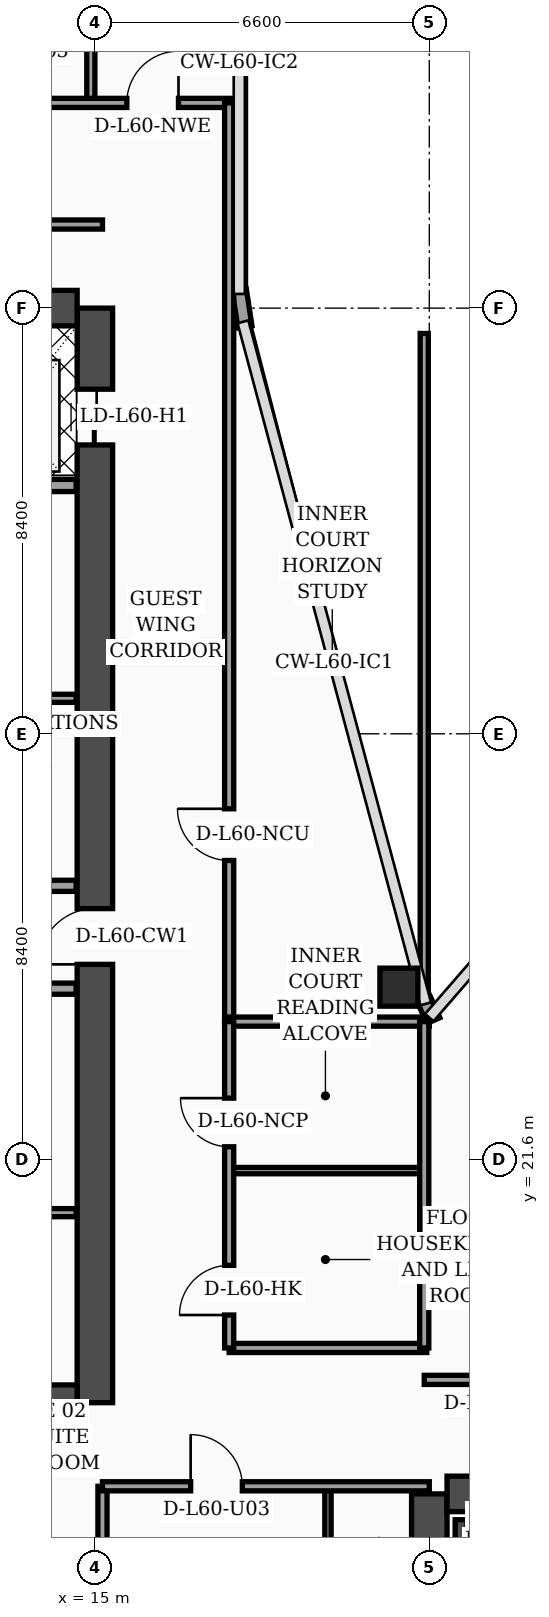
"""IFC4 building model, lengths in metres.
Left out: names, types, materials, properties, quantities, classifications, styles, units other than length and angle.
Written with IfcOpenShell. Run it as: python <this file> out.ifc"""

import sys

from ifc_helpers import new_model, si_unit, direction, frame, frame_2d, origin, origin_2d, place, context, subcontext, project, spatial, rectangle, hollow_rectangle, extrude, element, fill, save


model = new_model("IFC4")
c1 = context("Model", 3, precision=1e-05, world=origin(), true_north=direction((0.0, 1.0)))
c2 = subcontext(c1, "Body", "Model", "MODEL_VIEW")
j1 = project(units=[si_unit("LENGTHUNIT", "METRE"), si_unit("PLANEANGLEUNIT", "RADIAN")], contexts=[c1])
p1 = place(None, origin())
s1 = spatial("IfcSite", under=j1, at=p1, CompositionType="ELEMENT")
p2 = place(p1, origin())
s2 = spatial("IfcBuilding", under=s1, at=p2, CompositionType="ELEMENT")
p3 = place(p2, frame((0.0, 0.0, 243.8)))
s3 = spatial("IfcBuildingStorey", under=s2, at=p3, CompositionType="ELEMENT", Elevation=243.8)
p4 = place(p3, frame((15.0, 16.8, 0.0), z_axis=(0.0, 0.0, 1.0), x_axis=(0.0, 1.0, 0.0)))
e1 = element("IfcWall", 1, at=p4, inside=s3, PredefinedType="SHEAR", context=c2, shape_type="SweptSolid", body=[
    extrude(rectangle(XDim=21.6, YDim=0.7, at=frame_2d((10.8, 0.0))), origin(), (0.0, 0.0, 1.0), 3.56),
])
p5 = place(p4, frame((8.65, 0.0, 0.0)))
e2 = element("IfcOpeningElement", 2, at=p5, cuts=e1, PredefinedType="OPENING", context=c2, shape_type="SweptSolid", body=[
    extrude(rectangle(XDim=1.1, YDim=2.2, at=frame_2d((0.55, 1.1))), frame((0.0, 0.36, 0.0), z_axis=(0.0, -1.0, 0.0), x_axis=(1.0, 0.0, 0.0)), (0.0, 0.0, 1.0), 0.72),
])
p6 = place(p4, frame((18.9, 0.0, 0.0)))
e3 = element("IfcOpeningElement", 3, at=p6, cuts=e1, PredefinedType="OPENING", context=c2, shape_type="SweptSolid", body=[
    extrude(rectangle(XDim=1.1, YDim=2.2, at=frame_2d((0.55, 1.1))), frame((0.0, 0.36, 0.0), z_axis=(0.0, -1.0, 0.0), x_axis=(1.0, 0.0, 0.0)), (0.0, 0.0, 1.0), 0.72),
])
p7 = place(p3, frame((4.55, 38.4, 0.0), z_axis=(0.0, 0.0, 1.0), x_axis=(1.0, 0.0, 0.0)))
e4 = element("IfcWall", 4, at=p7, inside=s3, PredefinedType="SHEAR", context=c2, shape_type="SweptSolid", body=[
    extrude(rectangle(XDim=10.1, YDim=0.7, at=frame_2d((5.05, 0.0))), origin(), (0.0, 0.0, 1.0), 3.56),
])
p8 = place(p7, frame((5.75, 0.0, 0.0)))
e5 = element("IfcOpeningElement", 5, at=p8, cuts=e4, PredefinedType="OPENING", context=c2, shape_type="SweptSolid", body=[
    extrude(rectangle(XDim=1.1, YDim=2.2, at=frame_2d((0.55, 1.1))), frame((0.0, 0.36, 0.0), z_axis=(0.0, -1.0, 0.0), x_axis=(1.0, 0.0, 0.0)), (0.0, 0.0, 1.0), 0.72),
])
p9 = place(p3, frame((4.55, 16.8, 0.0), z_axis=(0.0, 0.0, 1.0), x_axis=(1.0, 0.0, 0.0)))
e6 = element("IfcWall", 6, at=p9, inside=s3, PredefinedType="SHEAR", context=c2, shape_type="SweptSolid", body=[
    extrude(rectangle(XDim=10.1, YDim=0.7, at=frame_2d((5.05, 0.0))), origin(), (0.0, 0.0, 1.0), 3.56),
])
p10 = place(p3, frame((21.6, 4.6, 0.0), z_axis=(0.0, 0.0, 1.0), x_axis=(0.0, 1.0, 0.0)))
e7 = element("IfcWall", 7, at=p10, inside=s3, PredefinedType="SHEAR", context=c2, shape_type="SweptSolid", body=[
    extrude(rectangle(XDim=10.4, YDim=0.7, at=frame_2d((5.2, 0.0))), origin(), (0.0, 0.0, 1.0), 3.56),
])
p11 = place(p3, frame((21.95, 15.0, 0.0), z_axis=(0.0, 0.0, 1.0), x_axis=(1.0, 0.0, 0.0)))
e8 = element("IfcWall", 8, at=p11, inside=s3, PredefinedType="SHEAR", context=c2, shape_type="SweptSolid", body=[
    extrude(rectangle(XDim=10.1, YDim=0.7, at=frame_2d((5.05, 0.0))), origin(), (0.0, 0.0, 1.0), 3.56),
])
p12 = place(p11, frame((4.95, 0.0, 0.0)))
e9 = element("IfcOpeningElement", 9, at=p12, cuts=e8, PredefinedType="OPENING", context=c2, shape_type="SweptSolid", body=[
    extrude(rectangle(XDim=1.1, YDim=2.2, at=frame_2d((0.55, 1.1))), frame((0.0, 0.36, 0.0), z_axis=(0.0, -1.0, 0.0), x_axis=(1.0, 0.0, 0.0)), (0.0, 0.0, 1.0), 0.72),
])
p13 = place(p3, frame((22.23, 4.95, 0.0), z_axis=(0.0, 0.0, 1.0), x_axis=(0.0, 1.0, 0.0)))
e10 = element("IfcWall", 10, at=p13, inside=s3, PredefinedType="SOLIDWALL", context=c2, shape_type="SweptSolid", body=[
    extrude(rectangle(XDim=9.54, YDim=0.24, at=frame_2d((4.77, 0.0))), origin(), (0.0, 0.0, 1.0), 3.56),
])
p14 = place(p3, frame((22.35, 14.37, 0.0), z_axis=(0.0, 0.0, 1.0), x_axis=(1.0, 0.0, 0.0)))
e11 = element("IfcWall", 11, at=p14, inside=s3, PredefinedType="SOLIDWALL", context=c2, shape_type="SweptSolid", body=[
    extrude(rectangle(XDim=3.1, YDim=0.24, at=frame_2d((1.55, 0.0))), origin(), (0.0, 0.0, 1.0), 3.56),
])
p15 = place(p3, frame((21.0, 25.0, 0.0), z_axis=(0.0, 0.0, 1.0), x_axis=(1.0, 0.0, 0.0)))
e12 = element("IfcColumn", 12, at=p15, inside=s3, PredefinedType="COLUMN", context=c2, shape_type="SweptSolid", body=[
    extrude(hollow_rectangle(XDim=0.75, YDim=0.75, WallThickness=0.032, at=origin_2d()), origin(), (0.0, 0.0, 1.0), 3.56),
])
p16 = place(p3, frame((21.68, 24.34, 0.0), z_axis=(0.0, 0.0, 1.0), x_axis=(-0.40758134973, 0.913168901875, 0.0)))
e13 = element("IfcWall", 13, at=p16, inside=s3, PredefinedType="SOLIDWALL", context=c2, shape_type="SweptSolid", body=[
    extrude(rectangle(XDim=0.471, YDim=0.28, at=frame_2d((0.235, 0.0))), origin(), (0.0, 0.0, 1.0), 3.56),
])
p17 = place(p3, frame((17.962, 38.03, 0.0), z_axis=(0.0, 0.0, 1.0), x_axis=(-0.15141125477, 0.988470855377, 0.0)))
e14 = element("IfcWall", 14, at=p17, inside=s3, PredefinedType="SOLIDWALL", context=c2, shape_type="SweptSolid", body=[
    extrude(rectangle(XDim=0.739, YDim=0.28, at=frame_2d((0.369, 0.0))), origin(), (0.0, 0.0, 1.0), 3.56),
])
p18 = place(p3, frame((9.68, 20.55, 0.0), z_axis=(0.0, 0.0, 1.0), x_axis=(1.0, 0.0, 0.0)))
e15 = element("IfcWall", 15, at=p18, inside=s3, PredefinedType="PARTITIONING", context=c2, shape_type="SweptSolid", body=[
    extrude(rectangle(XDim=4.95, YDim=0.16, at=frame_2d((2.475, 0.0))), origin(), (0.0, 0.0, 1.0), 3.56),
])
p19 = place(p18, frame((1.1, 0.0, 0.0)))
e16 = element("IfcOpeningElement", 16, at=p19, cuts=e15, PredefinedType="OPENING", context=c2, shape_type="SweptSolid", body=[
    extrude(rectangle(XDim=0.98, YDim=2.15, at=frame_2d((0.49, 1.075))), frame((0.0, 0.09, 0.0), z_axis=(0.0, -1.0, 0.0), x_axis=(1.0, 0.0, 0.0)), (0.0, 0.0, 1.0), 0.18),
])
p20 = place(p3, frame((9.68, 24.97, 0.0), z_axis=(0.0, 0.0, 1.0), x_axis=(1.0, 0.0, 0.0)))
e17 = element("IfcWall", 17, at=p20, inside=s3, PredefinedType="SOLIDWALL", context=c2, shape_type="SweptSolid", body=[
    extrude(rectangle(XDim=4.95, YDim=0.22, at=frame_2d((2.475, 0.0))), origin(), (0.0, 0.0, 1.0), 2.99),
])
p21 = place(p20, frame((0.9, 0.0, 0.0)))
e18 = element("IfcOpeningElement", 18, at=p21, cuts=e17, PredefinedType="OPENING", context=c2, shape_type="SweptSolid", body=[
    extrude(rectangle(XDim=0.98, YDim=2.15, at=frame_2d((0.49, 1.075))), frame((0.0, 0.12, 0.0), z_axis=(0.0, -1.0, 0.0), x_axis=(1.0, 0.0, 0.0)), (0.0, 0.0, 1.0), 0.24),
])
p22 = place(p3, frame((12.25, 27.0, 0.0), z_axis=(0.0, 0.0, 1.0), x_axis=(1.0, 0.0, 0.0)))
e19 = element("IfcWall", 19, at=p22, inside=s3, PredefinedType="SOLIDWALL", context=c2, shape_type="SweptSolid", body=[
    extrude(rectangle(XDim=2.38, YDim=0.22, at=frame_2d((1.19, 0.0))), origin(), (0.0, 0.0, 1.0), 3.56),
])
p23 = place(p3, frame((12.25, 30.7, 0.0), z_axis=(0.0, 0.0, 1.0), x_axis=(1.0, 0.0, 0.0)))
e20 = element("IfcWall", 20, at=p23, inside=s3, PredefinedType="PARTITIONING", context=c2, shape_type="SweptSolid", body=[
    extrude(rectangle(XDim=2.38, YDim=0.16, at=frame_2d((1.19, 0.0))), origin(), (0.0, 0.0, 1.0), 3.56),
])
p24 = place(p23, frame((0.55, 0.0, 0.0)))
e21 = element("IfcOpeningElement", 21, at=p24, cuts=e20, PredefinedType="OPENING", context=c2, shape_type="SweptSolid", body=[
    extrude(rectangle(XDim=0.98, YDim=2.15, at=frame_2d((0.49, 1.075))), frame((0.0, 0.09, 0.0), z_axis=(0.0, -1.0, 0.0), x_axis=(1.0, 0.0, 0.0)), (0.0, 0.0, 1.0), 0.18),
])
p25 = place(p3, frame((9.66, 34.9, 0.0), z_axis=(0.0, 0.0, 1.0), x_axis=(1.0, 0.0, 0.0)))
e22 = element("IfcWall", 22, at=p25, inside=s3, PredefinedType="SOLIDWALL", context=c2, shape_type="SweptSolid", body=[
    extrude(rectangle(XDim=4.97, YDim=0.24, at=frame_2d((2.485, 0.0))), origin(), (0.0, 0.0, 1.0), 3.56),
])
p26 = place(p3, frame((15.15, 2.44, 0.0), z_axis=(0.0, 0.0, 1.0), x_axis=(0.0, 1.0, 0.0)))
e23 = element("IfcWall", 23, at=p26, inside=s3, PredefinedType="PARTITIONING", context=c2, shape_type="SweptSolid", body=[
    extrude(rectangle(XDim=12.71, YDim=0.18, at=frame_2d((6.355, 0.0))), origin(), (0.0, 0.0, 1.0), 3.09),
])
p27 = place(p3, frame((19.6, 2.44, 0.0), z_axis=(0.0, 0.0, 1.0), x_axis=(0.0, 1.0, 0.0)))
e24 = element("IfcWall", 24, at=p27, inside=s3, PredefinedType="PARTITIONING", context=c2, shape_type="SweptSolid", body=[
    extrude(rectangle(XDim=12.71, YDim=0.125, at=frame_2d((6.355, 0.0))), origin(), (0.0, 0.0, 1.0), 2.59),
])
p28 = place(p27, frame((4.34, 0.0, 0.0)))
e25 = element("IfcOpeningElement", 25, at=p28, cuts=e24, PredefinedType="OPENING", context=c2, shape_type="SweptSolid", body=[
    extrude(rectangle(XDim=0.96, YDim=2.2, at=frame_2d((0.48, 1.1))), frame((0.0, 0.073, 0.0), z_axis=(0.0, -1.0, 0.0), x_axis=(1.0, 0.0, 0.0)), (0.0, 0.0, 1.0), 0.145),
])
p29 = place(p27, frame((10.18, 0.0, 0.0)))
e26 = element("IfcOpeningElement", 26, at=p29, cuts=e24, PredefinedType="OPENING", context=c2, shape_type="SweptSolid", body=[
    extrude(rectangle(XDim=0.9, YDim=2.15, at=frame_2d((0.45, 1.075))), frame((0.0, 0.073, 0.0), z_axis=(0.0, -1.0, 0.0), x_axis=(1.0, 0.0, 0.0)), (0.0, 0.0, 1.0), 0.145),
])
p30 = place(p3, frame((15.15, 15.15, 0.0), z_axis=(0.0, 0.0, 1.0), x_axis=(1.0, 0.0, 0.0)))
e27 = element("IfcWall", 27, at=p30, inside=s3, PredefinedType="PARTITIONING", context=c2, shape_type="SweptSolid", body=[
    extrude(rectangle(XDim=6.45, YDim=0.18, at=frame_2d((3.225, 0.0))), origin(), (0.0, 0.0, 1.0), 2.59),
])
p31 = place(p30, frame((1.74, 0.0, 0.0)))
e28 = element("IfcOpeningElement", 28, at=p31, cuts=e27, PredefinedType="OPENING", context=c2, shape_type="SweptSolid", body=[
    extrude(rectangle(XDim=1.02, YDim=2.2, at=frame_2d((0.51, 1.1))), frame((0.0, 0.1, 0.0), z_axis=(0.0, -1.0, 0.0), x_axis=(1.0, 0.0, 0.0)), (0.0, 0.0, 1.0), 0.2),
])
p32 = place(p3, frame((14.92, 42.45, 0.0), z_axis=(0.0, 0.0, 1.0), x_axis=(0.0, 1.0, 0.0)))
e29 = element("IfcWall", 29, at=p32, inside=s3, PredefinedType="PARTITIONING", context=c2, shape_type="SweptSolid", body=[
    extrude(rectangle(XDim=5.35, YDim=0.16, at=frame_2d((2.675, 0.0))), origin(), (0.0, 0.0, 1.0), 3.09),
])
p33 = place(p3, frame((0.08, 42.45, 0.0), z_axis=(0.0, 0.0, 1.0), x_axis=(1.0, 0.0, 0.0)))
e30 = element("IfcWall", 30, at=p33, inside=s3, PredefinedType="PARTITIONING", context=c2, shape_type="SweptSolid", body=[
    extrude(rectangle(XDim=17.77, YDim=0.18, at=frame_2d((8.885, 0.0))), origin(), (0.0, 0.0, 1.0), 2.99),
])
p34 = place(p33, frame((0.9, 0.0, 0.0)))
e31 = element("IfcOpeningElement", 31, at=p34, cuts=e30, PredefinedType="OPENING", context=c2, shape_type="SweptSolid", body=[
    extrude(rectangle(XDim=1.02, YDim=2.2, at=frame_2d((0.51, 1.1))), frame((0.0, 0.1, 0.0), z_axis=(0.0, -1.0, 0.0), x_axis=(1.0, 0.0, 0.0)), (0.0, 0.0, 1.0), 0.2),
])
p35 = place(p33, frame((4.2, 0.0, 0.0)))
e32 = element("IfcOpeningElement", 32, at=p35, cuts=e30, PredefinedType="OPENING", context=c2, shape_type="SweptSolid", body=[
    extrude(rectangle(XDim=1.02, YDim=2.2, at=frame_2d((0.51, 1.1))), frame((0.0, 0.1, 0.0), z_axis=(0.0, -1.0, 0.0), x_axis=(1.0, 0.0, 0.0)), (0.0, 0.0, 1.0), 0.2),
])
p36 = place(p33, frame((10.08, 0.0, 0.0)))
e33 = element("IfcOpeningElement", 33, at=p36, cuts=e30, PredefinedType="OPENING", context=c2, shape_type="SweptSolid", body=[
    extrude(rectangle(XDim=1.02, YDim=2.2, at=frame_2d((0.51, 1.1))), frame((0.0, 0.1, 0.0), z_axis=(0.0, -1.0, 0.0), x_axis=(1.0, 0.0, 0.0)), (0.0, 0.0, 1.0), 0.2),
])
p37 = place(p33, frame((15.55, 0.0, 0.0)))
e34 = element("IfcOpeningElement", 34, at=p37, cuts=e30, PredefinedType="OPENING", context=c2, shape_type="SweptSolid", body=[
    extrude(rectangle(XDim=1.02, YDim=2.2, at=frame_2d((0.51, 1.1))), frame((0.0, 0.1, 0.0), z_axis=(0.0, -1.0, 0.0), x_axis=(1.0, 0.0, 0.0)), (0.0, 0.0, 1.0), 0.2),
])
p38 = place(p3, frame((17.65, 24.3, 0.0), z_axis=(0.0, 0.0, 1.0), x_axis=(0.0, 1.0, 0.0)))
e35 = element("IfcWall", 35, at=p38, inside=s3, PredefinedType="PARTITIONING", context=c2, shape_type="SweptSolid", body=[
    extrude(rectangle(XDim=18.15, YDim=0.18, at=frame_2d((9.075, 0.0))), origin(), (0.0, 0.0, 1.0), 2.99),
])
p39 = place(p38, frame((3.2, 0.0, 0.0)))
e36 = element("IfcOpeningElement", 36, at=p39, cuts=e35, PredefinedType="OPENING", context=c2, shape_type="SweptSolid", body=[
    extrude(rectangle(XDim=1.02, YDim=2.2, at=frame_2d((0.51, 1.1))), frame((0.0, 0.1, 0.0), z_axis=(0.0, -1.0, 0.0), x_axis=(1.0, 0.0, 0.0)), (0.0, 0.0, 1.0), 0.2),
])
p40 = place(p3, frame((3.83, 40.05, 0.0), z_axis=(0.0, 0.0, 1.0), x_axis=(1.0, 0.0, 0.0)))
e37 = element("IfcWall", 37, at=p40, inside=s3, PredefinedType="PARTITIONING", context=c2, shape_type="SweptSolid", body=[
    extrude(rectangle(XDim=11.32, YDim=0.18, at=frame_2d((5.66, 0.0))), origin(), (0.0, 0.0, 1.0), 2.99),
])
p41 = place(p3, frame((17.65, 17.88, 0.0), z_axis=(0.0, 0.0, 1.0), x_axis=(1.0, 0.0, 0.0)))
e38 = element("IfcWall", 38, at=p41, inside=s3, PredefinedType="PARTITIONING", context=c2, shape_type="SweptSolid", body=[
    extrude(rectangle(XDim=3.9, YDim=0.18, at=frame_2d((1.95, 0.0))), origin(), (0.0, 0.0, 1.0), 3.09),
])
p42 = place(p3, frame((17.65, 21.38, 0.0), z_axis=(0.0, 0.0, 1.0), x_axis=(1.0, 0.0, 0.0)))
e39 = element("IfcWall", 39, at=p42, inside=s3, PredefinedType="PARTITIONING", context=c2, shape_type="SweptSolid", body=[
    extrude(rectangle(XDim=3.9, YDim=0.125, at=frame_2d((1.95, 0.0))), origin(), (0.0, 0.0, 1.0), 3.56),
])
p43 = place(p3, frame((17.65, 24.32, 0.0), z_axis=(0.0, 0.0, 1.0), x_axis=(1.0, 0.0, 0.0)))
e40 = element("IfcWall", 40, at=p43, inside=s3, PredefinedType="PARTITIONING", context=c2, shape_type="SweptSolid", body=[
    extrude(rectangle(XDim=3.95, YDim=0.18, at=frame_2d((1.975, 0.0))), origin(), (0.0, 0.0, 1.0), 3.56),
])
p44 = place(p3, frame((21.5, 17.88, 0.0), z_axis=(0.0, 0.0, 1.0), x_axis=(0.0, 1.0, 0.0)))
e41 = element("IfcWall", 41, at=p44, inside=s3, PredefinedType="PARTITIONING", context=c2, shape_type="SweptSolid", body=[
    extrude(rectangle(XDim=6.44, YDim=0.18, at=frame_2d((3.22, 0.0))), origin(), (0.0, 0.0, 1.0), 3.09),
])
p45 = place(p3, frame((17.65, 17.88, 0.0), z_axis=(0.0, 0.0, 1.0), x_axis=(0.0, 1.0, 0.0)))
e42 = element("IfcWall", 42, at=p45, inside=s3, PredefinedType="PARTITIONING", context=c2, shape_type="SweptSolid", body=[
    extrude(rectangle(XDim=6.44, YDim=0.18, at=frame_2d((3.22, 0.0))), origin(), (0.0, 0.0, 1.0), 3.09),
])
p46 = place(p45, frame((0.65, 0.0, 0.0)))
e43 = element("IfcOpeningElement", 43, at=p46, cuts=e42, PredefinedType="OPENING", context=c2, shape_type="SweptSolid", body=[
    extrude(rectangle(XDim=0.98, YDim=2.15, at=frame_2d((0.49, 1.075))), frame((0.0, 0.1, 0.0), z_axis=(0.0, -1.0, 0.0), x_axis=(1.0, 0.0, 0.0)), (0.0, 0.0, 1.0), 0.2),
])
p47 = place(p45, frame((3.97, 0.0, 0.0)))
e44 = element("IfcOpeningElement", 44, at=p47, cuts=e42, PredefinedType="OPENING", context=c2, shape_type="SweptSolid", body=[
    extrude(rectangle(XDim=0.96, YDim=2.2, at=frame_2d((0.48, 1.1))), frame((0.0, 0.1, 0.0), z_axis=(0.0, -1.0, 0.0), x_axis=(1.0, 0.0, 0.0)), (0.0, 0.0, 1.0), 0.2),
])
p48 = place(p3, frame((21.5, 24.85, 0.0), z_axis=(0.0, 0.0, 1.0), x_axis=(0.0, 1.0, 0.0)))
e45 = element("IfcWall", 45, at=p48, inside=s3, PredefinedType="PARTITIONING", context=c2, shape_type="SweptSolid", body=[
    extrude(rectangle(XDim=13.05, YDim=0.16, at=frame_2d((6.525, 0.0))), origin(), (0.0, 0.0, 1.0), 2.99),
])
p49 = place(p3, frame((21.5, 17.25, 0.0), z_axis=(0.0, 0.0, 1.0), x_axis=(1.0, 0.0, 0.0)))
e46 = element("IfcWall", 46, at=p49, inside=s3, PredefinedType="PARTITIONING", context=c2, shape_type="SweptSolid", body=[
    extrude(rectangle(XDim=6.9, YDim=0.18, at=frame_2d((3.45, 0.0))), origin(), (0.0, 0.0, 1.0), 2.99),
])
p50 = place(p49, frame((0.95, 0.0, 0.0)))
e47 = element("IfcOpeningElement", 47, at=p50, cuts=e46, PredefinedType="OPENING", context=c2, shape_type="SweptSolid", body=[
    extrude(rectangle(XDim=1.02, YDim=2.2, at=frame_2d((0.51, 1.1))), frame((0.0, 0.1, 0.0), z_axis=(0.0, -1.0, 0.0), x_axis=(1.0, 0.0, 0.0)), (0.0, 0.0, 1.0), 0.2),
])
p51 = place(p31, origin())
e48 = element("IfcDoor", 48, at=p51, inside=s3, OperationType="SINGLE_SWING_LEFT", PredefinedType="DOOR", context=c2, shape_type="SweptSolid", body=[
    extrude(rectangle(XDim=1.02, YDim=2.2, at=frame_2d((0.51, 1.1))), frame((0.0, 0.025, 0.0), z_axis=(0.0, -1.0, 0.0), x_axis=(1.0, 0.0, 0.0)), (0.0, 0.0, 1.0), 0.05),
])
fill(e28, e48)
p52 = place(p37, origin())
e49 = element("IfcDoor", 49, at=p52, inside=s3, OperationType="SINGLE_SWING_RIGHT", PredefinedType="DOOR", context=c2, shape_type="SweptSolid", body=[
    extrude(rectangle(XDim=1.02, YDim=2.2, at=frame_2d((0.51, 1.1))), frame((0.0, 0.025, 0.0), z_axis=(0.0, -1.0, 0.0), x_axis=(1.0, 0.0, 0.0)), (0.0, 0.0, 1.0), 0.05),
])
fill(e34, e49)
p53 = place(p39, origin())
e50 = element("IfcDoor", 50, at=p53, inside=s3, OperationType="SINGLE_SWING_RIGHT", PredefinedType="DOOR", context=c2, shape_type="SweptSolid", body=[
    extrude(rectangle(XDim=1.02, YDim=2.2, at=frame_2d((0.51, 1.1))), frame((0.0, 0.025, 0.0), z_axis=(0.0, -1.0, 0.0), x_axis=(1.0, 0.0, 0.0)), (0.0, 0.0, 1.0), 0.05),
])
fill(e36, e50)
p54 = place(p46, origin())
e51 = element("IfcDoor", 51, at=p54, inside=s3, OperationType="SINGLE_SWING_LEFT", PredefinedType="DOOR", context=c2, shape_type="SweptSolid", body=[
    extrude(rectangle(XDim=0.98, YDim=2.15, at=frame_2d((0.49, 1.075))), frame((0.0, 0.025, 0.0), z_axis=(0.0, -1.0, 0.0), x_axis=(1.0, 0.0, 0.0)), (0.0, 0.0, 1.0), 0.05),
])
fill(e43, e51)
p55 = place(p47, origin())
e52 = element("IfcDoor", 52, at=p55, inside=s3, OperationType="SINGLE_SWING_RIGHT", PredefinedType="DOOR", context=c2, shape_type="SweptSolid", body=[
    extrude(rectangle(XDim=0.96, YDim=2.2, at=frame_2d((0.48, 1.1))), frame((0.0, 0.025, 0.0), z_axis=(0.0, -1.0, 0.0), x_axis=(1.0, 0.0, 0.0)), (0.0, 0.0, 1.0), 0.05),
])
fill(e44, e52)
p56 = place(p5, origin())
e53 = element("IfcDoor", 53, at=p56, inside=s3, OperationType="SINGLE_SWING_LEFT", PredefinedType="DOOR", context=c2, shape_type="SweptSolid", body=[
    extrude(rectangle(XDim=1.1, YDim=2.2, at=frame_2d((0.55, 1.1))), frame((0.0, 0.025, 0.0), z_axis=(0.0, -1.0, 0.0), x_axis=(1.0, 0.0, 0.0)), (0.0, 0.0, 1.0), 0.05),
])
fill(e2, e53)
p57 = place(p6, origin())
e54 = element("IfcDoor", 54, at=p57, inside=s3, OperationType="DOUBLE_DOOR_SLIDING", PredefinedType="DOOR", context=c2, shape_type="SweptSolid", body=[
    extrude(rectangle(XDim=1.1, YDim=2.2, at=frame_2d((0.55, 1.1))), frame((0.0, 0.025, 0.0), z_axis=(0.0, -1.0, 0.0), x_axis=(1.0, 0.0, 0.0)), (0.0, 0.0, 1.0), 0.05),
])
fill(e3, e54)
save(model, sys.argv[1])
